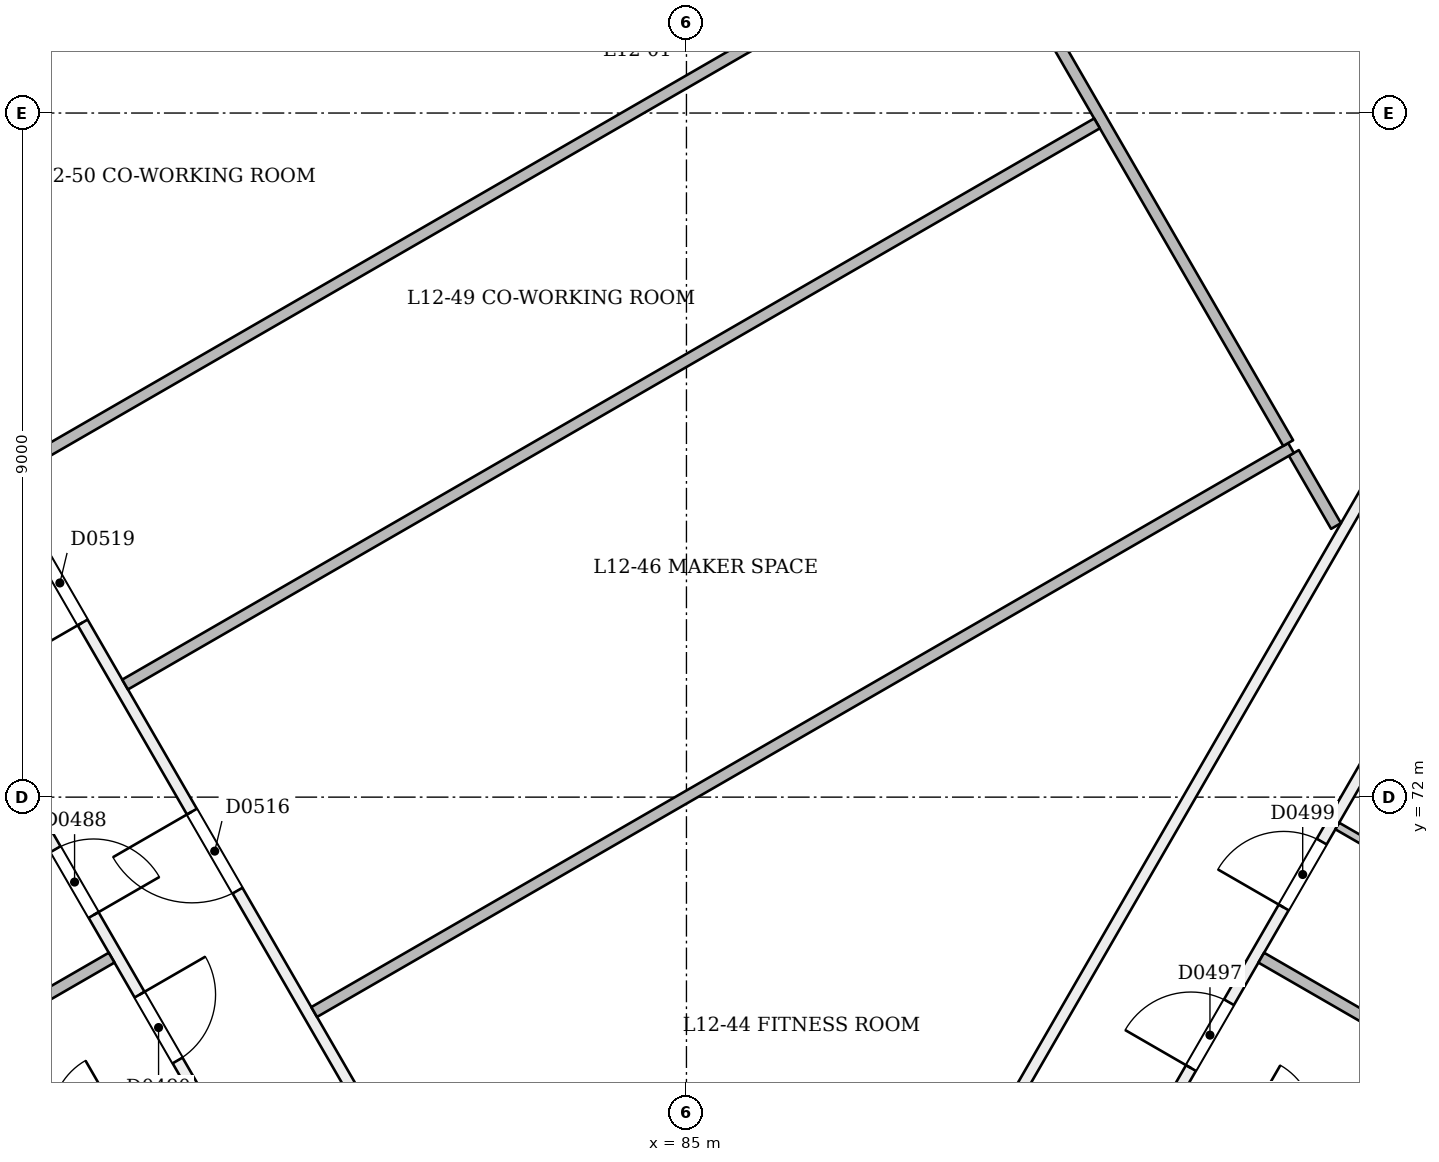
"""IFC4 building model, lengths in metres.
Left out: names, types, materials, properties, quantities, classifications, styles, units other than length and angle.
Written with IfcOpenShell. Run it as: python <this file> out.ifc"""

import sys

from ifc_helpers import new_model, si_unit, direction, frame, frame_2d, origin, place, context, subcontext, project, spatial, rectangle, extrude, element, fill, save


model = new_model("IFC4")
c1 = context("Model", 3, precision=1e-05, world=origin(), true_north=direction((0.0, 1.0)))
c2 = subcontext(c1, "Body", "Model", "MODEL_VIEW")
j1 = project(units=[si_unit("LENGTHUNIT", "METRE"), si_unit("PLANEANGLEUNIT", "RADIAN")], contexts=[c1])
p1 = place(None, origin())
s1 = spatial("IfcSite", under=j1, at=p1, CompositionType="ELEMENT")
p2 = place(p1, origin())
s2 = spatial("IfcBuilding", under=s1, at=p2, CompositionType="ELEMENT")
p3 = place(p2, frame((0.0, 0.0, 52.2)))
s3 = spatial("IfcBuildingStorey", under=s2, at=p3, CompositionType="ELEMENT", Elevation=52.2)
p4 = place(p3, frame((64.002, 93.308, 0.0), z_axis=(0.0, 0.0, 1.0), x_axis=(0.49999948646, -0.866025700277, 0.0)))
e1 = element("IfcWall", 1, at=p4, inside=s3, PredefinedType="PARTITIONING", context=c2, shape_type="SweptSolid", body=[
    extrude(rectangle(XDim=38.6, YDim=0.15, at=frame_2d((19.3, 0.0))), origin(), (0.0, 0.0, 1.0), 2.7),
])
p5 = place(p4, frame((0.605, 0.0, 0.0)))
e2 = element("IfcOpeningElement", 2, at=p5, cuts=e1, PredefinedType="OPENING", context=c2, shape_type="SweptSolid", body=[
    extrude(rectangle(XDim=1.0, YDim=2.1, at=frame_2d((0.5, 1.05))), frame((0.0, 0.085, 0.0), z_axis=(0.0, -1.0, 0.0), x_axis=(1.0, 0.0, 0.0)), (0.0, 0.0, 1.0), 0.171),
])
p6 = place(p4, frame((7.28, 0.0, 0.0)))
e3 = element("IfcOpeningElement", 3, at=p6, cuts=e1, PredefinedType="OPENING", context=c2, shape_type="SweptSolid", body=[
    extrude(rectangle(XDim=1.0, YDim=2.1, at=frame_2d((0.5, 1.05))), frame((0.0, 0.085, 0.0), z_axis=(0.0, -1.0, 0.0), x_axis=(1.0, 0.0, 0.0)), (0.0, 0.0, 1.0), 0.171),
])
p7 = place(p4, frame((9.72, 0.0, 0.0)))
e4 = element("IfcOpeningElement", 4, at=p7, cuts=e1, PredefinedType="OPENING", context=c2, shape_type="SweptSolid", body=[
    extrude(rectangle(XDim=1.0, YDim=2.1, at=frame_2d((0.5, 1.05))), frame((0.0, 0.085, 0.0), z_axis=(0.0, -1.0, 0.0), x_axis=(1.0, 0.0, 0.0)), (0.0, 0.0, 1.0), 0.171),
])
p8 = place(p4, frame((16.395, 0.0, 0.0)))
e5 = element("IfcOpeningElement", 5, at=p8, cuts=e1, PredefinedType="OPENING", context=c2, shape_type="SweptSolid", body=[
    extrude(rectangle(XDim=1.0, YDim=2.1, at=frame_2d((0.5, 1.05))), frame((0.0, 0.085, 0.0), z_axis=(0.0, -1.0, 0.0), x_axis=(1.0, 0.0, 0.0)), (0.0, 0.0, 1.0), 0.171),
])
p9 = place(p4, frame((18.72, 0.0, 0.0)))
e6 = element("IfcOpeningElement", 6, at=p9, cuts=e1, PredefinedType="OPENING", context=c2, shape_type="SweptSolid", body=[
    extrude(rectangle(XDim=1.0, YDim=2.1, at=frame_2d((0.5, 1.05))), frame((0.0, 0.085, 0.0), z_axis=(0.0, -1.0, 0.0), x_axis=(1.0, 0.0, 0.0)), (0.0, 0.0, 1.0), 0.171),
])
p10 = place(p4, frame((25.395, 0.0, 0.0)))
e7 = element("IfcOpeningElement", 7, at=p10, cuts=e1, PredefinedType="OPENING", context=c2, shape_type="SweptSolid", body=[
    extrude(rectangle(XDim=1.0, YDim=2.1, at=frame_2d((0.5, 1.05))), frame((0.0, 0.085, 0.0), z_axis=(0.0, -1.0, 0.0), x_axis=(1.0, 0.0, 0.0)), (0.0, 0.0, 1.0), 0.171),
])
p11 = place(p4, frame((27.605, 0.0, 0.0)))
e8 = element("IfcOpeningElement", 8, at=p11, cuts=e1, PredefinedType="OPENING", context=c2, shape_type="SweptSolid", body=[
    extrude(rectangle(XDim=1.0, YDim=2.1, at=frame_2d((0.5, 1.05))), frame((0.0, 0.085, 0.0), z_axis=(0.0, -1.0, 0.0), x_axis=(1.0, 0.0, 0.0)), (0.0, 0.0, 1.0), 0.171),
])
p12 = place(p4, frame((34.28, 0.0, 0.0)))
e9 = element("IfcOpeningElement", 9, at=p12, cuts=e1, PredefinedType="OPENING", context=c2, shape_type="SweptSolid", body=[
    extrude(rectangle(XDim=1.0, YDim=2.1, at=frame_2d((0.5, 1.05))), frame((0.0, 0.085, 0.0), z_axis=(0.0, -1.0, 0.0), x_axis=(1.0, 0.0, 0.0)), (0.0, 0.0, 1.0), 0.171),
])
p13 = place(p4, frame((37.324, 0.0, 0.0)))
e10 = element("IfcOpeningElement", 10, at=p13, cuts=e1, PredefinedType="OPENING", context=c2, shape_type="SweptSolid", body=[
    extrude(rectangle(XDim=1.0, YDim=2.1, at=frame_2d((0.5, 1.05))), frame((0.0, 0.085, 0.0), z_axis=(0.0, -1.0, 0.0), x_axis=(1.0, 0.0, 0.0)), (0.0, 0.0, 1.0), 0.171),
])
p14 = place(p3, frame((86.05, 58.757, 0.0), z_axis=(0.0, 0.0, 1.0), x_axis=(0.499999296855, 0.866025809745, 0.0)))
e11 = element("IfcWall", 11, at=p14, inside=s3, PredefinedType="PARTITIONING", context=c2, shape_type="SweptSolid", body=[
    extrude(rectangle(XDim=43.792, YDim=0.15, at=frame_2d((21.896, 0.0))), origin(), (0.0, 0.0, 1.0), 2.7),
])
p15 = place(p14, frame((3.598, 0.0, 0.0)))
e12 = element("IfcOpeningElement", 12, at=p15, cuts=e11, PredefinedType="OPENING", context=c2, shape_type="SweptSolid", body=[
    extrude(rectangle(XDim=1.2, YDim=2.1, at=frame_2d((0.6, 1.05))), frame((0.0, 0.085, 0.0), z_axis=(0.0, -1.0, 0.0), x_axis=(1.0, 0.0, 0.0)), (0.0, 0.0, 1.0), 0.171),
])
p16 = place(p14, frame((11.176, 0.0, 0.0)))
e13 = element("IfcOpeningElement", 13, at=p16, cuts=e11, PredefinedType="OPENING", context=c2, shape_type="SweptSolid", body=[
    extrude(rectangle(XDim=1.0, YDim=2.1, at=frame_2d((0.5, 1.05))), frame((0.0, 0.085, 0.0), z_axis=(0.0, -1.0, 0.0), x_axis=(1.0, 0.0, 0.0)), (0.0, 0.0, 1.0), 0.171),
])
p17 = place(p14, frame((13.616, 0.0, 0.0)))
e14 = element("IfcOpeningElement", 14, at=p17, cuts=e11, PredefinedType="OPENING", context=c2, shape_type="SweptSolid", body=[
    extrude(rectangle(XDim=1.0, YDim=2.1, at=frame_2d((0.5, 1.05))), frame((0.0, 0.085, 0.0), z_axis=(0.0, -1.0, 0.0), x_axis=(1.0, 0.0, 0.0)), (0.0, 0.0, 1.0), 0.171),
])
p18 = place(p14, frame((20.176, 0.0, 0.0)))
e15 = element("IfcOpeningElement", 15, at=p18, cuts=e11, PredefinedType="OPENING", context=c2, shape_type="SweptSolid", body=[
    extrude(rectangle(XDim=1.0, YDim=2.1, at=frame_2d((0.5, 1.05))), frame((0.0, 0.085, 0.0), z_axis=(0.0, -1.0, 0.0), x_axis=(1.0, 0.0, 0.0)), (0.0, 0.0, 1.0), 0.171),
])
p19 = place(p14, frame((22.616, 0.0, 0.0)))
e16 = element("IfcOpeningElement", 16, at=p19, cuts=e11, PredefinedType="OPENING", context=c2, shape_type="SweptSolid", body=[
    extrude(rectangle(XDim=1.0, YDim=2.1, at=frame_2d((0.5, 1.05))), frame((0.0, 0.085, 0.0), z_axis=(0.0, -1.0, 0.0), x_axis=(1.0, 0.0, 0.0)), (0.0, 0.0, 1.0), 0.171),
])
p20 = place(p14, frame((29.176, 0.0, 0.0)))
e17 = element("IfcOpeningElement", 17, at=p20, cuts=e11, PredefinedType="OPENING", context=c2, shape_type="SweptSolid", body=[
    extrude(rectangle(XDim=1.0, YDim=2.1, at=frame_2d((0.5, 1.05))), frame((0.0, 0.085, 0.0), z_axis=(0.0, -1.0, 0.0), x_axis=(1.0, 0.0, 0.0)), (0.0, 0.0, 1.0), 0.171),
])
p21 = place(p14, frame((31.616, 0.0, 0.0)))
e18 = element("IfcOpeningElement", 18, at=p21, cuts=e11, PredefinedType="OPENING", context=c2, shape_type="SweptSolid", body=[
    extrude(rectangle(XDim=1.0, YDim=2.1, at=frame_2d((0.5, 1.05))), frame((0.0, 0.085, 0.0), z_axis=(0.0, -1.0, 0.0), x_axis=(1.0, 0.0, 0.0)), (0.0, 0.0, 1.0), 0.171),
])
p22 = place(p14, frame((38.176, 0.0, 0.0)))
e19 = element("IfcOpeningElement", 19, at=p22, cuts=e11, PredefinedType="OPENING", context=c2, shape_type="SweptSolid", body=[
    extrude(rectangle(XDim=1.0, YDim=2.1, at=frame_2d((0.5, 1.05))), frame((0.0, 0.085, 0.0), z_axis=(0.0, -1.0, 0.0), x_axis=(1.0, 0.0, 0.0)), (0.0, 0.0, 1.0), 0.171),
])
p23 = place(p14, frame((41.344, 0.0, 0.0)))
e20 = element("IfcOpeningElement", 20, at=p23, cuts=e11, PredefinedType="OPENING", context=c2, shape_type="SweptSolid", body=[
    extrude(rectangle(XDim=1.0, YDim=2.1, at=frame_2d((0.5, 1.05))), frame((0.0, 0.085, 0.0), z_axis=(0.0, -1.0, 0.0), x_axis=(1.0, 0.0, 0.0)), (0.0, 0.0, 1.0), 0.171),
])
p24 = place(p3, frame((85.0, 60.54, 0.0), z_axis=(0.0, 0.0, 1.0), x_axis=(-0.500000084694, 0.866025354886, 0.0)))
e21 = element("IfcWall", 21, at=p24, inside=s3, PredefinedType="PARTITIONING", context=c2, shape_type="SweptSolid", body=[
    extrude(rectangle(XDim=34.711, YDim=0.15, at=frame_2d((17.355, 0.0))), origin(), (0.0, 0.0, 1.0), 3.1),
])
p25 = place(p24, frame((5.966, 0.0, 0.0)))
e22 = element("IfcOpeningElement", 22, at=p25, cuts=e21, PredefinedType="OPENING", context=c2, shape_type="SweptSolid", body=[
    extrude(rectangle(XDim=1.2, YDim=2.1, at=frame_2d((0.6, 1.05))), frame((0.0, 0.085, 0.0), z_axis=(0.0, -1.0, 0.0), x_axis=(1.0, 0.0, 0.0)), (0.0, 0.0, 1.0), 0.171),
])
p26 = place(p24, frame((11.813, 0.0, 0.0)))
e23 = element("IfcOpeningElement", 23, at=p26, cuts=e21, PredefinedType="OPENING", context=c2, shape_type="SweptSolid", body=[
    extrude(rectangle(XDim=1.2, YDim=2.1, at=frame_2d((0.6, 1.05))), frame((0.0, 0.085, 0.0), z_axis=(0.0, -1.0, 0.0), x_axis=(1.0, 0.0, 0.0)), (0.0, 0.0, 1.0), 0.171),
])
p27 = place(p24, frame((25.156, 0.0, 0.0)))
e24 = element("IfcOpeningElement", 24, at=p27, cuts=e21, PredefinedType="OPENING", context=c2, shape_type="SweptSolid", body=[
    extrude(rectangle(XDim=1.2, YDim=2.1, at=frame_2d((0.6, 1.05))), frame((0.0, 0.085, 0.0), z_axis=(0.0, -1.0, 0.0), x_axis=(1.0, 0.0, 0.0)), (0.0, 0.0, 1.0), 0.171),
])
p28 = place(p24, frame((30.288, 0.0, 0.0)))
e25 = element("IfcOpeningElement", 25, at=p28, cuts=e21, PredefinedType="OPENING", context=c2, shape_type="SweptSolid", body=[
    extrude(rectangle(XDim=1.2, YDim=2.1, at=frame_2d((0.6, 1.05))), frame((0.0, 0.085, 0.0), z_axis=(0.0, -1.0, 0.0), x_axis=(1.0, 0.0, 0.0)), (0.0, 0.0, 1.0), 0.171),
])
p29 = place(p24, frame((15.887, 0.0, 0.0)))
e26 = element("IfcOpeningElement", 26, at=p29, cuts=e21, PredefinedType="OPENING", context=c2, shape_type="SweptSolid", body=[
    extrude(rectangle(XDim=1.2, YDim=2.1, at=frame_2d((0.6, 1.05))), frame((0.0, 0.085, 0.0), z_axis=(0.0, -1.0, 0.0), x_axis=(1.0, 0.0, 0.0)), (0.0, 0.0, 1.0), 0.171),
])
p30 = place(p24, frame((19.777, 0.0, 0.0)))
e27 = element("IfcOpeningElement", 27, at=p30, cuts=e21, PredefinedType="OPENING", context=c2, shape_type="SweptSolid", body=[
    extrude(rectangle(XDim=1.2, YDim=2.1, at=frame_2d((0.6, 1.05))), frame((0.0, 0.085, 0.0), z_axis=(0.0, -1.0, 0.0), x_axis=(1.0, 0.0, 0.0)), (0.0, 0.0, 1.0), 0.171),
])
p31 = place(p3, frame((102.355, 90.6, 0.0), z_axis=(0.0, 0.0, 1.0), x_axis=(-0.500000924128, -0.866024870238, 0.0)))
e28 = element("IfcWall", 28, at=p31, inside=s3, PredefinedType="PARTITIONING", context=c2, shape_type="SweptSolid", body=[
    extrude(rectangle(XDim=34.581, YDim=0.15, at=frame_2d((17.291, 0.0))), origin(), (0.0, 0.0, 1.0), 3.1),
])
p32 = place(p31, frame((9.118, 0.0, 0.0)))
e29 = element("IfcOpeningElement", 29, at=p32, cuts=e28, PredefinedType="OPENING", context=c2, shape_type="SweptSolid", body=[
    extrude(rectangle(XDim=1.2, YDim=2.1, at=frame_2d((0.6, 1.05))), frame((0.0, 0.085, 0.0), z_axis=(0.0, -1.0, 0.0), x_axis=(1.0, 0.0, 0.0)), (0.0, 0.0, 1.0), 0.171),
])
p33 = place(p3, frame((71.942, 66.716, 0.0), z_axis=(0.0, 0.0, 1.0), x_axis=(0.866025401434, 0.500000004071, 0.0)))
e30 = element("IfcWall", 30, at=p33, inside=s3, PredefinedType="PARTITIONING", context=c2, shape_type="SweptSolid", body=[
    extrude(rectangle(XDim=6.345, YDim=0.15, at=frame_2d((3.173, 0.0))), origin(), (0.0, 0.0, 1.0), 2.6),
])
p34 = place(p3, frame((75.854, 66.78, 0.0), z_axis=(0.0, 0.0, 1.0), x_axis=(0.86601045545, 0.500025890382, 0.0)))
e31 = element("IfcWall", 31, at=p34, inside=s3, PredefinedType="PARTITIONING", context=c2, shape_type="SweptSolid", body=[
    extrude(rectangle(XDim=2.925, YDim=0.1, at=frame_2d((1.462, 0.0))), origin(), (0.0, 0.0, 1.0), 3.1),
])
p35 = place(p34, frame((1.05, 0.0, 0.0)))
e32 = element("IfcOpeningElement", 32, at=p35, cuts=e31, PredefinedType="OPENING", context=c2, shape_type="SweptSolid", body=[
    extrude(rectangle(XDim=0.9, YDim=2.1, at=frame_2d((0.45, 1.05))), frame((0.0, 0.061, 0.0), z_axis=(0.0, -1.0, 0.0), x_axis=(1.0, 0.0, 0.0)), (0.0, 0.0, 1.0), 0.121),
])
p36 = place(p3, frame((98.058, 66.716, 0.0), z_axis=(0.0, 0.0, 1.0), x_axis=(-0.866025401434, 0.500000004071, 0.0)))
e33 = element("IfcWall", 33, at=p36, inside=s3, PredefinedType="PARTITIONING", context=c2, shape_type="SweptSolid", body=[
    extrude(rectangle(XDim=6.345, YDim=0.15, at=frame_2d((3.173, 0.0))), origin(), (0.0, 0.0, 1.0), 2.6),
])
p37 = place(p3, frame((96.009, 70.208, 0.0), z_axis=(0.0, 0.0, 1.0), x_axis=(-0.866048868473, 0.499959355765, 0.0)))
e34 = element("IfcWall", 34, at=p37, inside=s3, PredefinedType="PARTITIONING", context=c2, shape_type="SweptSolid", body=[
    extrude(rectangle(XDim=2.825, YDim=0.1, at=frame_2d((1.413, 0.0))), origin(), (0.0, 0.0, 1.0), 3.1),
])
p38 = place(p3, frame((93.546, 75.567, 0.0), z_axis=(0.0, 0.0, 1.0), x_axis=(-0.500090643993, 0.865973064125, 0.0)))
e35 = element("IfcWall", 35, at=p38, inside=s3, PredefinedType="PARTITIONING", context=c2, shape_type="SweptSolid", body=[
    extrude(rectangle(XDim=1.11, YDim=0.15, at=frame_2d((0.555, 0.0))), origin(), (0.0, 0.0, 1.0), 3.1),
])
p39 = place(p3, frame((92.954, 76.593, 0.0), z_axis=(0.0, 0.0, 1.0), x_axis=(-0.866027508988, -0.499996353663, 0.0)))
e36 = element("IfcWall", 36, at=p39, inside=s3, PredefinedType="PARTITIONING", context=c2, shape_type="SweptSolid", body=[
    extrude(rectangle(XDim=14.84, YDim=0.15, at=frame_2d((7.42, 0.0))), origin(), (0.0, 0.0, 1.0), 3.1),
])
p40 = place(p3, frame((88.917, 83.584, 0.0), z_axis=(0.0, 0.0, 1.0), x_axis=(0.499986679841, -0.866033094045, 0.0)))
e37 = element("IfcWall", 37, at=p40, inside=s3, PredefinedType="PARTITIONING", context=c2, shape_type="SweptSolid", body=[
    extrude(rectangle(XDim=7.998, YDim=0.15, at=frame_2d((3.999, 0.0))), origin(), (0.0, 0.0, 1.0), 3.1),
])
p41 = place(p3, frame((90.401, 80.864, 0.0), z_axis=(0.0, 0.0, 1.0), x_axis=(-0.866026427659, -0.499998226593, 0.0)))
e38 = element("IfcWall", 38, at=p41, inside=s3, PredefinedType="PARTITIONING", context=c2, shape_type="SweptSolid", body=[
    extrude(rectangle(XDim=14.765, YDim=0.15, at=frame_2d((7.382, 0.0))), origin(), (0.0, 0.0, 1.0), 3.1),
])
p42 = place(p3, frame((86.083, 82.035, 0.0), z_axis=(0.0, 0.0, 1.0), x_axis=(-0.866028367734, -0.499994866253, 0.0)))
e39 = element("IfcWall", 39, at=p42, inside=s3, PredefinedType="PARTITIONING", context=c2, shape_type="SweptSolid", body=[
    extrude(rectangle(XDim=11.611, YDim=0.15, at=frame_2d((5.805, 0.0))), origin(), (0.0, 0.0, 1.0), 3.1),
])
p43 = place(p10, origin())
e40 = element("IfcDoor", 40, at=p43, inside=s3, OperationType="SINGLE_SWING_RIGHT", PredefinedType="NOTDEFINED", context=c2, shape_type="SweptSolid", body=[
    extrude(rectangle(XDim=1.0, YDim=2.1, at=frame_2d((0.5, 1.05))), frame((0.0, 0.025, 0.0), z_axis=(0.0, -1.0, 0.0), x_axis=(1.0, 0.0, 0.0)), (0.0, 0.0, 1.0), 0.05),
])
fill(e7, e40)
p44 = place(p11, origin())
e41 = element("IfcDoor", 41, at=p44, inside=s3, OperationType="SINGLE_SWING_LEFT", PredefinedType="NOTDEFINED", context=c2, shape_type="SweptSolid", body=[
    extrude(rectangle(XDim=1.0, YDim=2.1, at=frame_2d((0.5, 1.05))), frame((0.0, 0.025, 0.0), z_axis=(0.0, -1.0, 0.0), x_axis=(1.0, 0.0, 0.0)), (0.0, 0.0, 1.0), 0.05),
])
fill(e8, e41)
p45 = place(p16, origin())
e42 = element("IfcDoor", 42, at=p45, inside=s3, OperationType="SINGLE_SWING_LEFT", PredefinedType="NOTDEFINED", context=c2, shape_type="SweptSolid", body=[
    extrude(rectangle(XDim=1.0, YDim=2.1, at=frame_2d((0.5, 1.05))), frame((0.0, 0.025, 0.0), z_axis=(0.0, -1.0, 0.0), x_axis=(1.0, 0.0, 0.0)), (0.0, 0.0, 1.0), 0.05),
])
fill(e13, e42)
p46 = place(p17, origin())
e43 = element("IfcDoor", 43, at=p46, inside=s3, OperationType="SINGLE_SWING_LEFT", PredefinedType="NOTDEFINED", context=c2, shape_type="SweptSolid", body=[
    extrude(rectangle(XDim=1.0, YDim=2.1, at=frame_2d((0.5, 1.05))), frame((0.0, 0.025, 0.0), z_axis=(0.0, -1.0, 0.0), x_axis=(1.0, 0.0, 0.0)), (0.0, 0.0, 1.0), 0.05),
])
fill(e14, e43)
p47 = place(p26, origin())
e44 = element("IfcDoor", 44, at=p47, inside=s3, OperationType="SINGLE_SWING_RIGHT", PredefinedType="NOTDEFINED", context=c2, shape_type="SweptSolid", body=[
    extrude(rectangle(XDim=1.2, YDim=2.1, at=frame_2d((0.6, 1.05))), frame((0.0, 0.025, 0.0), z_axis=(0.0, -1.0, 0.0), x_axis=(1.0, 0.0, 0.0)), (0.0, 0.0, 1.0), 0.05),
])
fill(e23, e44)
p48 = place(p29, origin())
e45 = element("IfcDoor", 45, at=p48, inside=s3, OperationType="SINGLE_SWING_LEFT", PredefinedType="NOTDEFINED", context=c2, shape_type="SweptSolid", body=[
    extrude(rectangle(XDim=1.2, YDim=2.1, at=frame_2d((0.6, 1.05))), frame((0.0, 0.025, 0.0), z_axis=(0.0, -1.0, 0.0), x_axis=(1.0, 0.0, 0.0)), (0.0, 0.0, 1.0), 0.05),
])
fill(e26, e45)
save(model, sys.argv[1])
